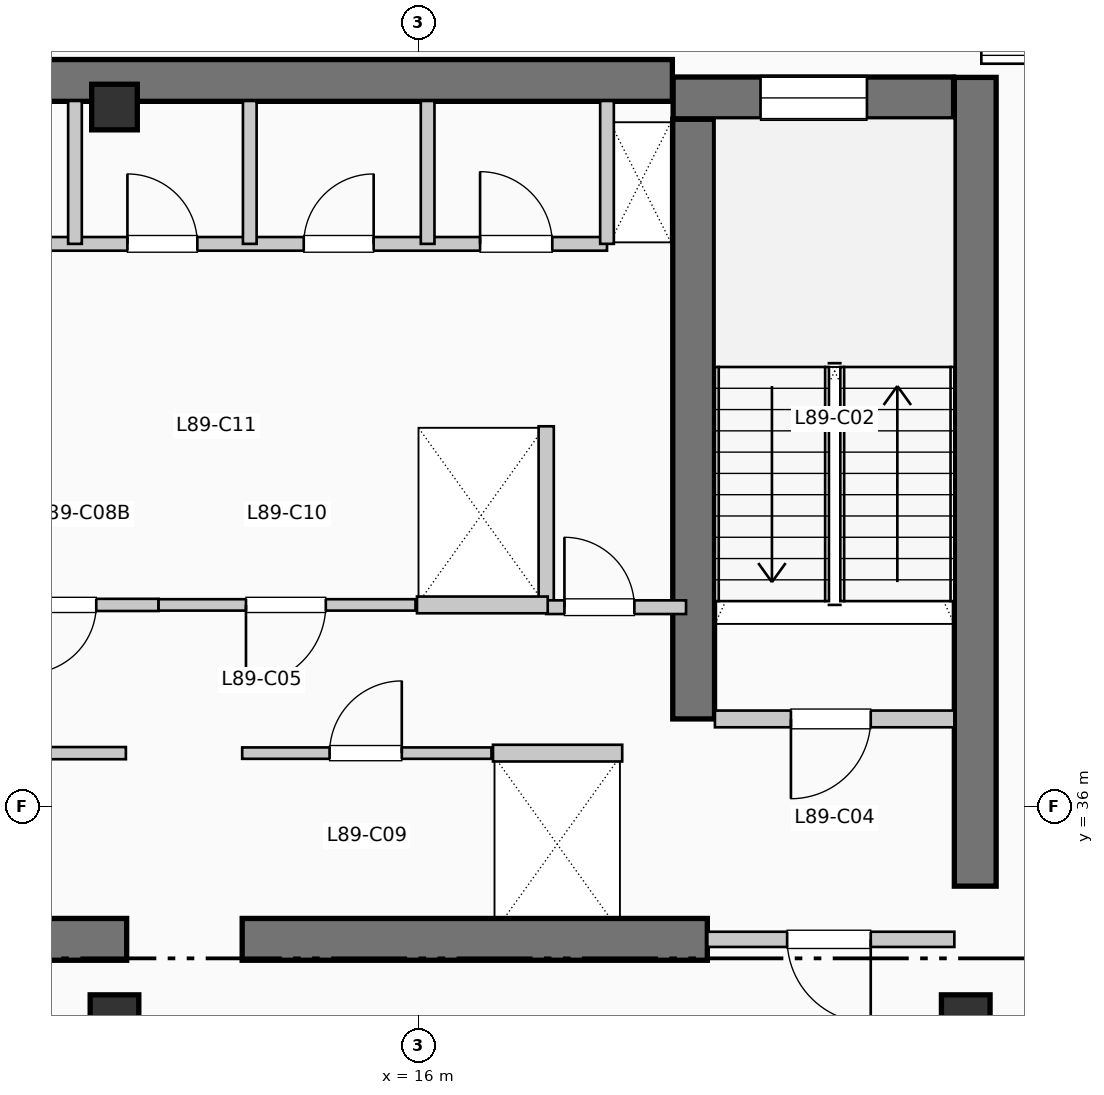
"""IFC4 building model, lengths in metres.
Left out: names, types, materials, properties, quantities, classifications, styles, units other than length and angle.
Written with IfcOpenShell. Run it as: python <this file> out.ifc"""

import sys

from ifc_helpers import new_model, si_unit, direction, frame, frame_2d, origin, origin_2d, place, context, subcontext, project, spatial, rectangle, extrude, element, fill, save


model = new_model("IFC4")
c1 = context("Model", 3, precision=1e-05, world=origin(), true_north=direction((0.0, 1.0)))
c2 = subcontext(c1, "Body", "Model", "MODEL_VIEW")
j1 = project(units=[si_unit("LENGTHUNIT", "METRE"), si_unit("PLANEANGLEUNIT", "RADIAN")], contexts=[c1])
p1 = place(None, origin())
s1 = spatial("IfcSite", under=j1, at=p1, CompositionType="ELEMENT")
p2 = place(p1, origin())
s2 = spatial("IfcBuilding", under=s1, at=p2, CompositionType="ELEMENT")
p3 = place(p2, frame((0.0, 0.0, 365.97)))
s3 = spatial("IfcBuildingStorey", under=s2, at=p3, CompositionType="ELEMENT", Elevation=365.97)
p4 = place(p3, frame((5.36, 45.55, 0.0), z_axis=(0.0, 0.0, 1.0), x_axis=(1.0, 0.0, 0.0)))
e1 = element("IfcWall", 1, at=p4, inside=s3, PredefinedType="SHEAR", context=c2, shape_type="SweptSolid", body=[
    extrude(rectangle(XDim=13.98, YDim=0.55, at=frame_2d((6.99, 0.0))), origin(), (0.0, 0.0, 1.0), 3.96),
])
p5 = place(p3, frame((23.325, 34.95, 0.0), z_axis=(0.0, 0.0, 1.0), x_axis=(0.0, 1.0, 0.0)))
e2 = element("IfcWall", 2, at=p5, inside=s3, PredefinedType="SHEAR", context=c2, shape_type="SweptSolid", body=[
    extrude(rectangle(XDim=10.64, YDim=0.55, at=frame_2d((5.32, 0.0))), origin(), (0.0, 0.0, 1.0), 3.96),
])
p6 = place(p3, frame((1.45, 34.25, 0.0), z_axis=(0.0, 0.0, 1.0), x_axis=(1.0, 0.0, 0.0)))
e3 = element("IfcWall", 3, at=p6, inside=s3, PredefinedType="SHEAR", context=c2, shape_type="SweptSolid", body=[
    extrude(rectangle(XDim=10.71, YDim=0.55, at=frame_2d((5.355, 0.0))), origin(), (0.0, 0.0, 1.0), 3.96),
])
p7 = place(p6, frame((7.25, 0.0, 0.0), z_axis=(0.0, 0.0, 1.0), x_axis=(-1.0, 0.0, 0.0)))
e4 = element("IfcOpeningElement", 4, at=p7, cuts=e3, PredefinedType="OPENING", context=c2, shape_type="SweptSolid", body=[
    extrude(rectangle(XDim=1.1, YDim=2.15, at=frame_2d((0.55, 1.075))), frame((0.0, 0.285, 0.0), z_axis=(0.0, -1.0, 0.0), x_axis=(1.0, 0.0, 0.0)), (0.0, 0.0, 1.0), 0.57),
])
p8 = place(p3, frame((13.68, 34.25, 0.0), z_axis=(0.0, 0.0, 1.0), x_axis=(1.0, 0.0, 0.0)))
e5 = element("IfcWall", 5, at=p8, inside=s3, PredefinedType="SHEAR", context=c2, shape_type="SweptSolid", body=[
    extrude(rectangle(XDim=6.12, YDim=0.55, at=frame_2d((3.06, 0.0))), origin(), (0.0, 0.0, 1.0), 3.96),
])
p9 = place(p3, frame((19.62, 37.15, 0.0), z_axis=(0.0, 0.0, 1.0), x_axis=(0.0, 1.0, 0.0)))
e6 = element("IfcWall", 6, at=p9, inside=s3, PredefinedType="SHEAR", context=c2, shape_type="SweptSolid", body=[
    extrude(rectangle(XDim=7.89, YDim=0.55, at=frame_2d((3.945, 0.0))), origin(), (0.0, 0.0, 1.0), 3.96),
])
p10 = place(p3, frame((19.35, 45.32, 0.0), z_axis=(0.0, 0.0, 1.0), x_axis=(1.0, 0.0, 0.0)))
e7 = element("IfcWall", 7, at=p10, inside=s3, PredefinedType="SHEAR", context=c2, shape_type="SweptSolid", body=[
    extrude(rectangle(XDim=3.69, YDim=0.55, at=frame_2d((1.845, 0.0))), origin(), (0.0, 0.0, 1.0), 3.96),
])
p11 = place(p10, frame((1.15, 0.0, 1.05)))
e8 = element("IfcOpeningElement", 8, at=p11, cuts=e7, PredefinedType="OPENING", context=c2, shape_type="SweptSolid", body=[
    extrude(rectangle(XDim=1.4, YDim=1.8, at=frame_2d((0.7, 0.9))), frame((0.0, 0.285, 0.0), z_axis=(0.0, -1.0, 0.0), x_axis=(1.0, 0.0, 0.0)), (0.0, 0.0, 1.0), 0.57),
])
p12 = place(p3, frame((12.0, 33.2, 0.0), z_axis=(0.0, 0.0, 1.0), x_axis=(1.0, 0.0, 0.0)))
e9 = element("IfcColumn", 9, at=p12, inside=s3, PredefinedType="COLUMN", context=c2, shape_type="SweptSolid", body=[
    extrude(rectangle(XDim=0.64, YDim=0.64, at=origin_2d()), origin(), (0.0, 0.0, 1.0), 3.96),
])
p13 = place(p3, frame((12.0, 45.2, 0.0), z_axis=(0.0, 0.0, 1.0), x_axis=(1.0, 0.0, 0.0)))
e10 = element("IfcColumn", 10, at=p13, inside=s3, PredefinedType="COLUMN", context=c2, shape_type="SweptSolid", body=[
    extrude(rectangle(XDim=0.6, YDim=0.6, at=origin_2d()), origin(), (0.0, 0.0, 1.0), 3.96),
])
p14 = place(p3, frame((23.2, 33.2, 0.0), z_axis=(0.0, 0.0, 1.0), x_axis=(1.0, 0.0, 0.0)))
e11 = element("IfcColumn", 11, at=p14, inside=s3, PredefinedType="COLUMN", context=c2, shape_type="SweptSolid", body=[
    extrude(rectangle(XDim=0.64, YDim=0.64, at=origin_2d()), origin(), (0.0, 0.0, 1.0), 3.96),
])
p15 = place(p3, frame((19.9, 37.15, 0.0), z_axis=(0.0, 0.0, 1.0), x_axis=(1.0, 0.0, 0.0)))
e12 = element("IfcWall", 12, at=p15, inside=s3, PredefinedType="PARTITIONING", context=c2, shape_type="SweptSolid", body=[
    extrude(rectangle(XDim=3.15, YDim=0.22, at=frame_2d((1.575, 0.0))), origin(), (0.0, 0.0, 1.0), 3.61),
])
p16 = place(p15, frame((2.05, 0.0, 0.0), z_axis=(0.0, 0.0, 1.0), x_axis=(-1.0, 0.0, 0.0)))
e13 = element("IfcOpeningElement", 13, at=p16, cuts=e12, PredefinedType="OPENING", context=c2, shape_type="SweptSolid", body=[
    extrude(rectangle(XDim=1.05, YDim=2.15, at=frame_2d((0.525, 1.075))), frame((0.0, 0.12, 0.0), z_axis=(0.0, -1.0, 0.0), x_axis=(1.0, 0.0, 0.0)), (0.0, 0.0, 1.0), 0.24),
])
p17 = place(p3, frame((19.8, 34.25, 0.0), z_axis=(0.0, 0.0, 1.0), x_axis=(1.0, 0.0, 0.0)))
e14 = element("IfcWall", 14, at=p17, inside=s3, PredefinedType="PARTITIONING", context=c2, shape_type="SweptSolid", body=[
    extrude(rectangle(XDim=3.25, YDim=0.2, at=frame_2d((1.625, 0.0))), origin(), (0.0, 0.0, 1.0), 3.61),
])
p18 = place(p17, frame((2.15, 0.0, 0.0), z_axis=(0.0, 0.0, 1.0), x_axis=(-1.0, 0.0, 0.0)))
e15 = element("IfcOpeningElement", 15, at=p18, cuts=e14, PredefinedType="OPENING", context=c2, shape_type="SweptSolid", body=[
    extrude(rectangle(XDim=1.1, YDim=2.15, at=frame_2d((0.55, 1.075))), frame((0.0, 0.11, 0.0), z_axis=(0.0, -1.0, 0.0), x_axis=(1.0, 0.0, 0.0)), (0.0, 0.0, 1.0), 0.22),
])
p19 = place(p3, frame((17.68, 38.65, 0.0), z_axis=(0.0, 0.0, 1.0), x_axis=(0.0, 1.0, 0.0)))
e16 = element("IfcWall", 16, at=p19, inside=s3, PredefinedType="PARTITIONING", context=c2, shape_type="SweptSolid", body=[
    extrude(rectangle(XDim=2.35, YDim=0.2, at=frame_2d((1.175, 0.0))), origin(), (0.0, 0.0, 1.0), 3.61),
])
p20 = place(p3, frame((17.68, 38.62, 0.0), z_axis=(0.0, 0.0, 1.0), x_axis=(1.0, 0.0, 0.0)))
e17 = element("IfcWall", 17, at=p20, inside=s3, PredefinedType="PARTITIONING", context=c2, shape_type="SweptSolid", body=[
    extrude(rectangle(XDim=1.84, YDim=0.18, at=frame_2d((0.92, 0.0))), origin(), (0.0, 0.0, 1.0), 3.61),
])
p21 = place(p20, frame((0.24, 0.0, 0.0)))
e18 = element("IfcOpeningElement", 18, at=p21, cuts=e17, PredefinedType="OPENING", context=c2, shape_type="SweptSolid", body=[
    extrude(rectangle(XDim=0.92, YDim=2.1, at=frame_2d((0.46, 1.05))), frame((0.0, 0.1, 0.0), z_axis=(0.0, -1.0, 0.0), x_axis=(1.0, 0.0, 0.0)), (0.0, 0.0, 1.0), 0.2),
])
p22 = place(p3, frame((8.9, 36.7, 0.0), z_axis=(0.0, 0.0, 1.0), x_axis=(1.0, 0.0, 0.0)))
e19 = element("IfcWall", 19, at=p22, inside=s3, PredefinedType="PARTITIONING", context=c2, shape_type="SweptSolid", body=[
    extrude(rectangle(XDim=3.25, YDim=0.16, at=frame_2d((1.625, 0.0))), origin(), (0.0, 0.0, 1.0), 3.61),
])
p23 = place(p22, frame((1.1, 0.0, 0.0)))
e20 = element("IfcOpeningElement", 20, at=p23, cuts=e19, PredefinedType="OPENING", context=c2, shape_type="SweptSolid", body=[
    extrude(rectangle(XDim=0.95, YDim=2.15, at=frame_2d((0.475, 1.075))), frame((0.0, 0.09, 0.0), z_axis=(0.0, -1.0, 0.0), x_axis=(1.0, 0.0, 0.0)), (0.0, 0.0, 1.0), 0.18),
])
p24 = place(p3, frame((9.16, 38.65, 0.0), z_axis=(0.0, 0.0, 1.0), x_axis=(1.0, 0.0, 0.0)))
e21 = element("IfcWall", 21, at=p24, inside=s3, PredefinedType="PARTITIONING", context=c2, shape_type="SweptSolid", body=[
    extrude(rectangle(XDim=3.42, YDim=0.16, at=frame_2d((1.71, 0.0))), origin(), (0.0, 0.0, 1.0), 3.61),
])
p25 = place(p24, frame((1.18, 0.0, 0.0), z_axis=(0.0, 0.0, 1.0), x_axis=(-1.0, 0.0, 0.0)))
e22 = element("IfcOpeningElement", 22, at=p25, cuts=e21, PredefinedType="OPENING", context=c2, shape_type="SweptSolid", body=[
    extrude(rectangle(XDim=0.9, YDim=2.15, at=frame_2d((0.45, 1.075))), frame((0.0, 0.09, 0.0), z_axis=(0.0, -1.0, 0.0), x_axis=(1.0, 0.0, 0.0)), (0.0, 0.0, 1.0), 0.18),
])
p26 = place(p24, frame((2.6, 0.0, 0.0), z_axis=(0.0, 0.0, 1.0), x_axis=(-1.0, 0.0, 0.0)))
e23 = element("IfcOpeningElement", 23, at=p26, cuts=e21, PredefinedType="OPENING", context=c2, shape_type="SweptSolid", body=[
    extrude(rectangle(XDim=0.9, YDim=2.15, at=frame_2d((0.45, 1.075))), frame((0.0, 0.09, 0.0), z_axis=(0.0, -1.0, 0.0), x_axis=(1.0, 0.0, 0.0)), (0.0, 0.0, 1.0), 0.18),
])
p27 = place(p3, frame((13.68, 36.7, 0.0), z_axis=(0.0, 0.0, 1.0), x_axis=(1.0, 0.0, 0.0)))
e24 = element("IfcWall", 24, at=p27, inside=s3, PredefinedType="PARTITIONING", context=c2, shape_type="SweptSolid", body=[
    extrude(rectangle(XDim=3.28, YDim=0.15, at=frame_2d((1.64, 0.0))), origin(), (0.0, 0.0, 1.0), 3.61),
])
p28 = place(p27, frame((1.15, 0.0, 0.0)))
e25 = element("IfcOpeningElement", 25, at=p28, cuts=e24, PredefinedType="OPENING", context=c2, shape_type="SweptSolid", body=[
    extrude(rectangle(XDim=0.95, YDim=2.15, at=frame_2d((0.475, 1.075))), frame((0.0, 0.085, 0.0), z_axis=(0.0, -1.0, 0.0), x_axis=(1.0, 0.0, 0.0)), (0.0, 0.0, 1.0), 0.17),
])
p29 = place(p3, frame((12.58, 38.65, 0.0), z_axis=(0.0, 0.0, 1.0), x_axis=(1.0, 0.0, 0.0)))
e26 = element("IfcWall", 26, at=p29, inside=s3, PredefinedType="PARTITIONING", context=c2, shape_type="SweptSolid", body=[
    extrude(rectangle(XDim=3.38, YDim=0.15, at=frame_2d((1.69, 0.0))), origin(), (0.0, 0.0, 1.0), 3.61),
])
p30 = place(p29, frame((2.2, 0.0, 0.0), z_axis=(0.0, 0.0, 1.0), x_axis=(-1.0, 0.0, 0.0)))
e27 = element("IfcOpeningElement", 27, at=p30, cuts=e26, PredefinedType="OPENING", context=c2, shape_type="SweptSolid", body=[
    extrude(rectangle(XDim=1.05, YDim=2.15, at=frame_2d((0.525, 1.075))), frame((0.0, 0.085, 0.0), z_axis=(0.0, -1.0, 0.0), x_axis=(1.0, 0.0, 0.0)), (0.0, 0.0, 1.0), 0.17),
])
p31 = place(p3, frame((16.98, 36.7, 0.0), z_axis=(0.0, 0.0, 1.0), x_axis=(1.0, 0.0, 0.0)))
e28 = element("IfcWall", 28, at=p31, inside=s3, PredefinedType="PARTITIONING", context=c2, shape_type="SweptSolid", body=[
    extrude(rectangle(XDim=1.7, YDim=0.22, at=frame_2d((0.85, 0.0))), origin(), (0.0, 0.0, 1.0), 3.61),
])
p32 = place(p3, frame((15.98, 38.65, 0.0), z_axis=(0.0, 0.0, 1.0), x_axis=(1.0, 0.0, 0.0)))
e29 = element("IfcWall", 29, at=p32, inside=s3, PredefinedType="PARTITIONING", context=c2, shape_type="SweptSolid", body=[
    extrude(rectangle(XDim=1.72, YDim=0.22, at=frame_2d((0.86, 0.0))), origin(), (0.0, 0.0, 1.0), 3.61),
])
p33 = place(p3, frame((9.15, 43.4, 0.0), z_axis=(0.0, 0.0, 1.0), x_axis=(1.0, 0.0, 0.0)))
e30 = element("IfcWall", 30, at=p33, inside=s3, PredefinedType="PLUMBINGWALL", context=c2, shape_type="SweptSolid", body=[
    extrude(rectangle(XDim=9.33, YDim=0.18, at=frame_2d((4.665, 0.0))), origin(), (0.0, 0.0, 1.0), 3.61),
])
p34 = place(p33, frame((0.72, 0.0, 0.0)))
e31 = element("IfcOpeningElement", 31, at=p34, cuts=e30, PredefinedType="OPENING", context=c2, shape_type="SweptSolid", body=[
    extrude(rectangle(XDim=0.92, YDim=2.1, at=frame_2d((0.46, 1.05))), frame((0.0, 0.1, 0.0), z_axis=(0.0, -1.0, 0.0), x_axis=(1.0, 0.0, 0.0)), (0.0, 0.0, 1.0), 0.2),
])
p35 = place(p33, frame((3.02, 0.0, 0.0)))
e32 = element("IfcOpeningElement", 32, at=p35, cuts=e30, PredefinedType="OPENING", context=c2, shape_type="SweptSolid", body=[
    extrude(rectangle(XDim=0.92, YDim=2.1, at=frame_2d((0.46, 1.05))), frame((0.0, 0.1, 0.0), z_axis=(0.0, -1.0, 0.0), x_axis=(1.0, 0.0, 0.0)), (0.0, 0.0, 1.0), 0.2),
])
p36 = place(p33, frame((5.34, 0.0, 0.0)))
e33 = element("IfcOpeningElement", 33, at=p36, cuts=e30, PredefinedType="OPENING", context=c2, shape_type="SweptSolid", body=[
    extrude(rectangle(XDim=0.92, YDim=2.1, at=frame_2d((0.46, 1.05))), frame((0.0, 0.1, 0.0), z_axis=(0.0, -1.0, 0.0), x_axis=(1.0, 0.0, 0.0)), (0.0, 0.0, 1.0), 0.2),
])
p37 = place(p33, frame((7.66, 0.0, 0.0)))
e34 = element("IfcOpeningElement", 34, at=p37, cuts=e30, PredefinedType="OPENING", context=c2, shape_type="SweptSolid", body=[
    extrude(rectangle(XDim=0.95, YDim=2.1, at=frame_2d((0.475, 1.05))), frame((0.0, 0.1, 0.0), z_axis=(0.0, -1.0, 0.0), x_axis=(1.0, 0.0, 0.0)), (0.0, 0.0, 1.0), 0.2),
])
for number, where, z_axis, x_axis in (
    (35, (18.48, 43.4, 0.0), (0.0, 0.0, 1.0), (0.0, 1.0, 0.0)),
    (36, (11.48, 43.4, 0.0), (0.0, 0.0, 1.0), (0.0, 1.0, 0.0)),
    (37, (13.78, 43.4, 0.0), (0.0, 0.0, 1.0), (0.0, 1.0, 0.0)),
    (38, (16.12, 43.4, 0.0), (0.0, 0.0, 1.0), (0.0, 1.0, 0.0)),
):
    element("IfcWall", number, at=place(p3, frame(where, z_axis=z_axis, x_axis=x_axis)), inside=s3, PredefinedType="PLUMBINGWALL", context=c2, shape_type="SweptSolid", body=[
        extrude(rectangle(XDim=1.88, YDim=0.18, at=frame_2d((0.94, 0.0))), origin(), (0.0, 0.0, 1.0), 3.61),
    ])
p38 = place(p11, origin())
e39 = element("IfcWindow", 39, at=p38, inside=s3, PartitioningType="SINGLE_PANEL", PredefinedType="WINDOW", context=c2, shape_type="SweptSolid", body=[
    extrude(rectangle(XDim=1.4, YDim=1.8, at=frame_2d((0.7, 0.9))), frame((0.0, 0.03, 0.0), z_axis=(0.0, -1.0, 0.0), x_axis=(1.0, 0.0, 0.0)), (0.0, 0.0, 1.0), 0.06),
])
fill(e8, e39)
p39 = place(p16, origin())
e40 = element("IfcDoor", 40, at=p39, inside=s3, OperationType="SINGLE_SWING_LEFT", PredefinedType="DOOR", context=c2, shape_type="SweptSolid", body=[
    extrude(rectangle(XDim=1.05, YDim=2.15, at=frame_2d((0.525, 1.075))), frame((0.0, 0.025, 0.0), z_axis=(0.0, -1.0, 0.0), x_axis=(1.0, 0.0, 0.0)), (0.0, 0.0, 1.0), 0.05),
])
fill(e13, e40)
p40 = place(p18, origin())
e41 = element("IfcDoor", 41, at=p40, inside=s3, OperationType="SINGLE_SWING_RIGHT", PredefinedType="DOOR", context=c2, shape_type="SweptSolid", body=[
    extrude(rectangle(XDim=1.1, YDim=2.15, at=frame_2d((0.55, 1.075))), frame((0.0, 0.025, 0.0), z_axis=(0.0, -1.0, 0.0), x_axis=(1.0, 0.0, 0.0)), (0.0, 0.0, 1.0), 0.05),
])
fill(e15, e41)
p41 = place(p21, origin())
e42 = element("IfcDoor", 42, at=p41, inside=s3, OperationType="SINGLE_SWING_LEFT", PredefinedType="DOOR", context=c2, shape_type="SweptSolid", body=[
    extrude(rectangle(XDim=0.92, YDim=2.1, at=frame_2d((0.46, 1.05))), frame((0.0, 0.025, 0.0), z_axis=(0.0, -1.0, 0.0), x_axis=(1.0, 0.0, 0.0)), (0.0, 0.0, 1.0), 0.05),
])
fill(e18, e42)
p42 = place(p26, origin())
e43 = element("IfcDoor", 43, at=p42, inside=s3, OperationType="SINGLE_SWING_LEFT", PredefinedType="DOOR", context=c2, shape_type="SweptSolid", body=[
    extrude(rectangle(XDim=0.9, YDim=2.15, at=frame_2d((0.45, 1.075))), frame((0.0, 0.025, 0.0), z_axis=(0.0, -1.0, 0.0), x_axis=(1.0, 0.0, 0.0)), (0.0, 0.0, 1.0), 0.05),
])
fill(e23, e43)
p43 = place(p28, origin())
e44 = element("IfcDoor", 44, at=p43, inside=s3, OperationType="SINGLE_SWING_RIGHT", PredefinedType="DOOR", context=c2, shape_type="SweptSolid", body=[
    extrude(rectangle(XDim=0.95, YDim=2.15, at=frame_2d((0.475, 1.075))), frame((0.0, 0.025, 0.0), z_axis=(0.0, -1.0, 0.0), x_axis=(1.0, 0.0, 0.0)), (0.0, 0.0, 1.0), 0.05),
])
fill(e25, e44)
p44 = place(p30, origin())
e45 = element("IfcDoor", 45, at=p44, inside=s3, OperationType="SINGLE_SWING_LEFT", PredefinedType="DOOR", context=c2, shape_type="SweptSolid", body=[
    extrude(rectangle(XDim=1.05, YDim=2.15, at=frame_2d((0.525, 1.075))), frame((0.0, 0.025, 0.0), z_axis=(0.0, -1.0, 0.0), x_axis=(1.0, 0.0, 0.0)), (0.0, 0.0, 1.0), 0.05),
])
fill(e27, e45)
p45 = place(p35, origin())
e46 = element("IfcDoor", 46, at=p45, inside=s3, OperationType="SINGLE_SWING_LEFT", PredefinedType="DOOR", context=c2, shape_type="SweptSolid", body=[
    extrude(rectangle(XDim=0.92, YDim=2.1, at=frame_2d((0.46, 1.05))), frame((0.0, 0.025, 0.0), z_axis=(0.0, -1.0, 0.0), x_axis=(1.0, 0.0, 0.0)), (0.0, 0.0, 1.0), 0.05),
])
fill(e32, e46)
p46 = place(p36, origin())
e47 = element("IfcDoor", 47, at=p46, inside=s3, OperationType="SINGLE_SWING_RIGHT", PredefinedType="DOOR", context=c2, shape_type="SweptSolid", body=[
    extrude(rectangle(XDim=0.92, YDim=2.1, at=frame_2d((0.46, 1.05))), frame((0.0, 0.025, 0.0), z_axis=(0.0, -1.0, 0.0), x_axis=(1.0, 0.0, 0.0)), (0.0, 0.0, 1.0), 0.05),
])
fill(e33, e47)
p47 = place(p37, origin())
e48 = element("IfcDoor", 48, at=p47, inside=s3, OperationType="SINGLE_SWING_LEFT", PredefinedType="DOOR", context=c2, shape_type="SweptSolid", body=[
    extrude(rectangle(XDim=0.95, YDim=2.1, at=frame_2d((0.475, 1.05))), frame((0.0, 0.025, 0.0), z_axis=(0.0, -1.0, 0.0), x_axis=(1.0, 0.0, 0.0)), (0.0, 0.0, 1.0), 0.05),
])
fill(e34, e48)
save(model, sys.argv[1])
